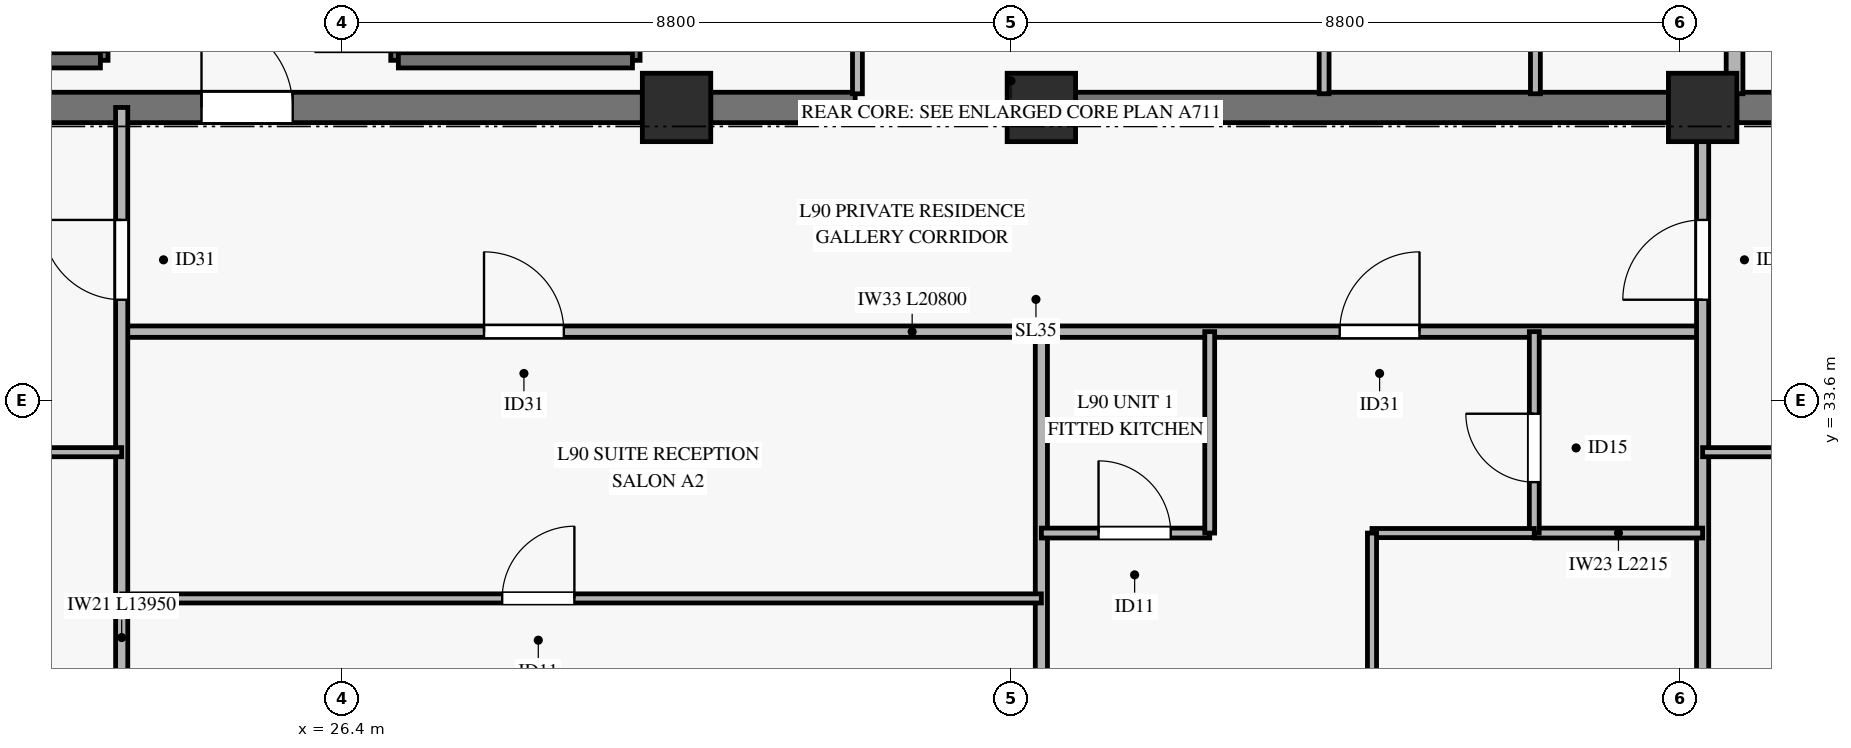
"""IFC4 building model, lengths in metres.
Left out: names, types, materials, properties, quantities, classifications, styles, units other than length and angle.
Written with IfcOpenShell. Run it as: python <this file> out.ifc"""

import sys

from ifc_helpers import new_model, si_unit, direction, frame, frame_2d, origin, origin_2d, place, context, subcontext, project, spatial, rectangle, extrude, source, transform, mapped, element, fill, save


model = new_model("IFC4")
c1 = context("Model", 3, precision=1e-05, world=origin(), true_north=direction((0.0, 1.0)))
c2 = subcontext(c1, "Body", "Model", "MODEL_VIEW")
j1 = project(units=[si_unit("LENGTHUNIT", "METRE"), si_unit("PLANEANGLEUNIT", "RADIAN")], contexts=[c1])
p1 = place(None, origin())
s1 = spatial("IfcSite", under=j1, at=p1, CompositionType="ELEMENT")
p2 = place(p1, origin())
s2 = spatial("IfcBuilding", under=s1, at=p2, CompositionType="ELEMENT")
p3 = place(p2, frame((0.0, 0.0, 345.9)))
s3 = spatial("IfcBuildingStorey", under=s2, at=p3, CompositionType="ELEMENT", Elevation=345.9)
m1 = source(origin(), c2, "Body", "SweptSolid", [
    extrude(rectangle(XDim=0.9, YDim=0.9, at=origin_2d()), origin(), (0.0, 0.0, 1.0), 3.185),
])
for number, where, z_axis, x_axis in (
    (1, (30.8, 37.45, 0.0), (0.0, 0.0, 1.0), (1.0, 0.0, 0.0)),
    (2, (35.6, 37.45, 0.0), (0.0, 0.0, 1.0), (1.0, 0.0, 0.0)),
    (3, (44.3, 37.45, 0.0), (0.0, 0.0, 1.0), (1.0, 0.0, 0.0)),
):
    element("IfcColumn", number, at=place(p3, frame(where, z_axis=z_axis, x_axis=x_axis)), inside=s3, PredefinedType="PILASTER", context=c2, shape_type="MappedRepresentation", body=[
        mapped(m1, transform((0.0, 0.0, 0.0), x_axis=(1.0, 0.0, 0.0), y_axis=(0.0, 1.0, 0.0), z_axis=(0.0, 0.0, 1.0), scale=1.0)),
    ])
p4 = place(p3, frame((20.3, 37.45, 0.0), z_axis=(0.0, 0.0, 1.0), x_axis=(1.0, 0.0, 0.0)))
e4 = element("IfcWall", 4, at=p4, inside=s3, PredefinedType="SHEAR", context=c2, shape_type="SweptSolid", body=[
    extrude(rectangle(XDim=10.05, YDim=0.4, at=frame_2d((5.025, 0.0))), origin(), (0.0, 0.0, 1.0), 3.185),
])
p5 = place(p4, frame((4.25, 0.0, 0.0)))
e5 = element("IfcOpeningElement", 5, at=p5, cuts=e4, PredefinedType="OPENING", context=c2, shape_type="SweptSolid", body=[
    extrude(rectangle(XDim=1.2, YDim=2.15, at=frame_2d((0.6, 1.075))), frame((0.0, 0.21, 0.0), z_axis=(0.0, -1.0, 0.0), x_axis=(1.0, 0.0, 0.0)), (0.0, 0.0, 1.0), 0.42),
])
p6 = place(p3, frame((31.25, 37.45, 0.0), z_axis=(0.0, 0.0, 1.0), x_axis=(1.0, 0.0, 0.0)))
e6 = element("IfcWall", 6, at=p6, inside=s3, PredefinedType="SHEAR", context=c2, shape_type="SweptSolid", body=[
    extrude(rectangle(XDim=1.9, YDim=0.4, at=frame_2d((0.95, 0.0))), origin(), (0.0, 0.0, 1.0), 3.185),
])
p7 = place(p3, frame((36.05, 37.45, 0.0), z_axis=(0.0, 0.0, 1.0), x_axis=(1.0, 0.0, 0.0)))
e7 = element("IfcWall", 7, at=p7, inside=s3, PredefinedType="SHEAR", context=c2, shape_type="SweptSolid", body=[
    extrude(rectangle(XDim=7.8, YDim=0.4, at=frame_2d((3.9, 0.0))), origin(), (0.0, 0.0, 1.0), 3.185),
])
p8 = place(p3, frame((44.75, 37.45, 0.0), z_axis=(0.0, 0.0, 1.0), x_axis=(1.0, 0.0, 0.0)))
e8 = element("IfcWall", 8, at=p8, inside=s3, PredefinedType="SHEAR", context=c2, shape_type="SweptSolid", body=[
    extrude(rectangle(XDim=5.35, YDim=0.4, at=frame_2d((2.675, 0.0))), origin(), (0.0, 0.0, 1.0), 3.185),
])
p9 = place(p8, frame((0.7, 0.0, 0.0)))
e9 = element("IfcOpeningElement", 9, at=p9, cuts=e8, PredefinedType="OPENING", context=c2, shape_type="SweptSolid", body=[
    extrude(rectangle(XDim=1.2, YDim=2.15, at=frame_2d((0.6, 1.075))), frame((0.0, 0.21, 0.0), z_axis=(0.0, -1.0, 0.0), x_axis=(1.0, 0.0, 0.0)), (0.0, 0.0, 1.0), 0.42),
])
p10 = place(p3, frame((23.22, 38.07, 0.0), z_axis=(0.0, 0.0, 1.0), x_axis=(0.0, 1.0, 0.0)))
e10 = element("IfcWall", 10, at=p10, inside=s3, PredefinedType="SOLIDWALL", context=c2, shape_type="SweptSolid", body=[
    extrude(rectangle(XDim=7.25, YDim=0.2, at=frame_2d((3.625, 0.0))), origin(), (0.0, 0.0, 1.0), 3.4),
])
p11 = place(p10, frame((0.11, 0.0, 0.0)))
e11 = element("IfcOpeningElement", 11, at=p11, cuts=e10, PredefinedType="OPENING", context=c2, shape_type="SweptSolid", body=[
    extrude(rectangle(XDim=1.1, YDim=2.15, at=frame_2d((0.55, 1.075))), frame((0.0, 0.11, 0.0), z_axis=(0.0, -1.0, 0.0), x_axis=(1.0, 0.0, 0.0)), (0.0, 0.0, 1.0), 0.22),
])
p12 = place(p3, frame((20.17, 38.07, 0.0), z_axis=(0.0, 0.0, 1.0), x_axis=(1.0, 0.0, 0.0)))
e12 = element("IfcWall", 12, at=p12, inside=s3, PredefinedType="SOLIDWALL", context=c2, shape_type="SweptSolid", body=[
    extrude(rectangle(XDim=3.05, YDim=0.2, at=frame_2d((1.525, 0.0))), origin(), (0.0, 0.0, 1.0), 3.4),
])
p13 = place(p3, frame((27.14, 38.07, 0.0), z_axis=(0.0, 0.0, 1.0), x_axis=(0.0, 1.0, 0.0)))
e13 = element("IfcWall", 13, at=p13, inside=s3, PredefinedType="SOLIDWALL", context=c2, shape_type="SweptSolid", body=[
    extrude(rectangle(XDim=7.25, YDim=0.2, at=frame_2d((3.625, 0.0))), origin(), (0.0, 0.0, 1.0), 3.4),
])
p14 = place(p13, frame((0.11, 0.0, 0.0)))
e14 = element("IfcOpeningElement", 14, at=p14, cuts=e13, PredefinedType="OPENING", context=c2, shape_type="SweptSolid", body=[
    extrude(rectangle(XDim=1.1, YDim=2.15, at=frame_2d((0.55, 1.075))), frame((0.0, 0.11, 0.0), z_axis=(0.0, -1.0, 0.0), x_axis=(1.0, 0.0, 0.0)), (0.0, 0.0, 1.0), 0.22),
])
p15 = place(p3, frame((30.22, 38.07, 0.0), z_axis=(0.0, 0.0, 1.0), x_axis=(0.0, 1.0, 0.0)))
e15 = element("IfcWall", 15, at=p15, inside=s3, PredefinedType="SOLIDWALL", context=c2, shape_type="SweptSolid", body=[
    extrude(rectangle(XDim=7.25, YDim=0.2, at=frame_2d((3.625, 0.0))), origin(), (0.0, 0.0, 1.0), 3.4),
])
p16 = place(p3, frame((27.14, 38.07, 0.0), z_axis=(0.0, 0.0, 1.0), x_axis=(1.0, 0.0, 0.0)))
e16 = element("IfcWall", 16, at=p16, inside=s3, PredefinedType="SOLIDWALL", context=c2, shape_type="SweptSolid", body=[
    extrude(rectangle(XDim=3.08, YDim=0.2, at=frame_2d((1.54, 0.0))), origin(), (0.0, 0.0, 1.0), 3.4),
])
p17 = place(p3, frame((44.72, 37.63, 0.0), z_axis=(0.0, 0.0, 1.0), x_axis=(0.0, 1.0, 0.0)))
e17 = element("IfcWall", 17, at=p17, inside=s3, PredefinedType="SOLIDWALL", context=c2, shape_type="SweptSolid", body=[
    extrude(rectangle(XDim=7.59, YDim=0.22, at=frame_2d((3.795, 0.0))), origin(), (0.0, 0.0, 1.0), 3.185),
])
p18 = place(p3, frame((33.18, 37.63, 0.0), z_axis=(0.0, 0.0, 1.0), x_axis=(0.0, 1.0, 0.0)))
e18 = element("IfcWall", 18, at=p18, inside=s3, PredefinedType="PARTITIONING", context=c2, shape_type="SweptSolid", body=[
    extrude(rectangle(XDim=6.52, YDim=0.13, at=frame_2d((3.26, 0.0))), origin(), (0.0, 0.0, 1.0), 2.27),
])
p19 = place(p18, frame((2.27, 0.0, 0.0)))
e19 = element("IfcOpeningElement", 19, at=p19, cuts=e18, PredefinedType="OPENING", context=c2, shape_type="SweptSolid", body=[
    extrude(rectangle(XDim=0.9, YDim=2.1, at=frame_2d((0.45, 1.05))), frame((0.0, 0.075, 0.0), z_axis=(0.0, -1.0, 0.0), x_axis=(1.0, 0.0, 0.0)), (0.0, 0.0, 1.0), 0.15),
])
p20 = place(p3, frame((39.32, 37.63, 0.0), z_axis=(0.0, 0.0, 1.0), x_axis=(0.0, 1.0, 0.0)))
e20 = element("IfcWall", 20, at=p20, inside=s3, PredefinedType="PARTITIONING", context=c2, shape_type="SweptSolid", body=[
    extrude(rectangle(XDim=8.74, YDim=0.13, at=frame_2d((4.37, 0.0))), origin(), (0.0, 0.0, 1.0), 3.185),
])
p21 = place(p20, frame((4.89, 0.0, 0.0)))
e21 = element("IfcOpeningElement", 21, at=p21, cuts=e20, PredefinedType="OPENING", context=c2, shape_type="SweptSolid", body=[
    extrude(rectangle(XDim=0.9, YDim=2.1, at=frame_2d((0.45, 1.05))), frame((0.0, 0.075, 0.0), z_axis=(0.0, -1.0, 0.0), x_axis=(1.0, 0.0, 0.0)), (0.0, 0.0, 1.0), 0.15),
])
p22 = place(p3, frame((42.1, 37.63, 0.0), z_axis=(0.0, 0.0, 1.0), x_axis=(0.0, 1.0, 0.0)))
e22 = element("IfcWall", 22, at=p22, inside=s3, PredefinedType="PARTITIONING", context=c2, shape_type="SweptSolid", body=[
    extrude(rectangle(XDim=8.74, YDim=0.13, at=frame_2d((4.37, 0.0))), origin(), (0.0, 0.0, 1.0), 3.185),
])
p23 = place(p22, frame((2.17, 0.0, 0.0)))
e23 = element("IfcOpeningElement", 23, at=p23, cuts=e22, PredefinedType="OPENING", context=c2, shape_type="SweptSolid", body=[
    extrude(rectangle(XDim=0.9, YDim=2.1, at=frame_2d((0.45, 1.05))), frame((0.0, 0.075, 0.0), z_axis=(0.0, -1.0, 0.0), x_axis=(1.0, 0.0, 0.0)), (0.0, 0.0, 1.0), 0.15),
])
p24 = place(p3, frame((23.5, 34.5, 0.0), z_axis=(0.0, 0.0, 1.0), x_axis=(1.0, 0.0, 0.0)))
e24 = element("IfcWall", 24, at=p24, inside=s3, PredefinedType="PARTITIONING", context=c2, shape_type="SweptSolid", body=[
    extrude(rectangle(XDim=20.8, YDim=0.15, at=frame_2d((10.4, 0.0))), origin(), (0.0, 0.0, 1.0), 2.47),
])
p25 = place(p24, frame((4.767, 0.0, 0.0)))
e25 = element("IfcOpeningElement", 25, at=p25, cuts=e24, PredefinedType="OPENING", context=c2, shape_type="SweptSolid", body=[
    extrude(rectangle(XDim=1.05, YDim=2.15, at=frame_2d((0.525, 1.075))), frame((0.0, 0.085, 0.0), z_axis=(0.0, -1.0, 0.0), x_axis=(1.0, 0.0, 0.0)), (0.0, 0.0, 1.0), 0.17),
])
p26 = place(p24, frame((16.025, 0.0, 0.0)))
e26 = element("IfcOpeningElement", 26, at=p26, cuts=e24, PredefinedType="OPENING", context=c2, shape_type="SweptSolid", body=[
    extrude(rectangle(XDim=1.05, YDim=2.15, at=frame_2d((0.525, 1.075))), frame((0.0, 0.085, 0.0), z_axis=(0.0, -1.0, 0.0), x_axis=(1.0, 0.0, 0.0)), (0.0, 0.0, 1.0), 0.17),
])
p27 = place(p3, frame((23.5, 23.5, 0.0), z_axis=(0.0, 0.0, 1.0), x_axis=(0.0, 1.0, 0.0)))
e27 = element("IfcWall", 27, at=p27, inside=s3, PredefinedType="PARTITIONING", context=c2, shape_type="SweptSolid", body=[
    extrude(rectangle(XDim=13.95, YDim=0.16, at=frame_2d((6.975, 0.0))), origin(), (0.0, 0.0, 1.0), 2.77),
])
p28 = place(p27, frame((11.42, 0.0, 0.0)))
e28 = element("IfcOpeningElement", 28, at=p28, cuts=e27, PredefinedType="OPENING", context=c2, shape_type="SweptSolid", body=[
    extrude(rectangle(XDim=1.05, YDim=2.15, at=frame_2d((0.525, 1.075))), frame((0.0, 0.09, 0.0), z_axis=(0.0, -1.0, 0.0), x_axis=(1.0, 0.0, 0.0)), (0.0, 0.0, 1.0), 0.18),
])
p29 = place(p3, frame((35.6, 23.5, 0.0), z_axis=(0.0, 0.0, 1.0), x_axis=(0.0, 1.0, 0.0)))
e29 = element("IfcWall", 29, at=p29, inside=s3, PredefinedType="PARTITIONING", context=c2, shape_type="SweptSolid", body=[
    extrude(rectangle(XDim=11.0, YDim=0.16, at=frame_2d((5.5, 0.0))), origin(), (0.0, 0.0, 1.0), 2.77),
])
p30 = place(p3, frame((44.3, 23.5, 0.0), z_axis=(0.0, 0.0, 1.0), x_axis=(0.0, 1.0, 0.0)))
e30 = element("IfcWall", 30, at=p30, inside=s3, PredefinedType="PARTITIONING", context=c2, shape_type="SweptSolid", body=[
    extrude(rectangle(XDim=13.95, YDim=0.16, at=frame_2d((6.975, 0.0))), origin(), (0.0, 0.0, 1.0), 2.47),
])
p31 = place(p30, frame((11.42, 0.0, 0.0)))
e31 = element("IfcOpeningElement", 31, at=p31, cuts=e30, PredefinedType="OPENING", context=c2, shape_type="SweptSolid", body=[
    extrude(rectangle(XDim=1.05, YDim=2.15, at=frame_2d((0.525, 1.075))), frame((0.0, 0.09, 0.0), z_axis=(0.0, -1.0, 0.0), x_axis=(1.0, 0.0, 0.0)), (0.0, 0.0, 1.0), 0.18),
])
p32 = place(p3, frame((12.1, 32.914, 0.0), z_axis=(0.0, 0.0, 1.0), x_axis=(1.0, 0.0, 0.0)))
e32 = element("IfcWall", 32, at=p32, inside=s3, PredefinedType="PARTITIONING", context=c2, shape_type="SweptSolid", body=[
    extrude(rectangle(XDim=11.4, YDim=0.12, at=frame_2d((5.7, 0.0))), origin(), (0.0, 0.0, 1.0), 2.47),
])
p33 = place(p32, frame((4.846, 0.0, 0.0)))
e33 = element("IfcOpeningElement", 33, at=p33, cuts=e32, PredefinedType="OPENING", context=c2, shape_type="SweptSolid", body=[
    extrude(rectangle(XDim=0.95, YDim=2.1, at=frame_2d((0.475, 1.05))), frame((0.0, 0.07, 0.0), z_axis=(0.0, -1.0, 0.0), x_axis=(1.0, 0.0, 0.0)), (0.0, 0.0, 1.0), 0.14),
])
p34 = place(p3, frame((23.5, 30.99, 0.0), z_axis=(0.0, 0.0, 1.0), x_axis=(1.0, 0.0, 0.0)))
e34 = element("IfcWall", 34, at=p34, inside=s3, PredefinedType="PARTITIONING", context=c2, shape_type="SweptSolid", body=[
    extrude(rectangle(XDim=12.1, YDim=0.12, at=frame_2d((6.05, 0.0))), origin(), (0.0, 0.0, 1.0), 2.47),
])
p35 = place(p34, frame((5.006, 0.0, 0.0)))
e35 = element("IfcOpeningElement", 35, at=p35, cuts=e34, PredefinedType="OPENING", context=c2, shape_type="SweptSolid", body=[
    extrude(rectangle(XDim=0.95, YDim=2.1, at=frame_2d((0.475, 1.05))), frame((0.0, 0.07, 0.0), z_axis=(0.0, -1.0, 0.0), x_axis=(1.0, 0.0, 0.0)), (0.0, 0.0, 1.0), 0.14),
])
p36 = place(p3, frame((35.6, 31.85, 0.0), z_axis=(0.0, 0.0, 1.0), x_axis=(1.0, 0.0, 0.0)))
e36 = element("IfcWall", 36, at=p36, inside=s3, PredefinedType="PARTITIONING", context=c2, shape_type="SweptSolid", body=[
    extrude(rectangle(XDim=2.215, YDim=0.13, at=frame_2d((1.107, 0.0))), origin(), (0.0, 0.0, 1.0), 2.47),
])
p37 = place(p36, frame((0.752, 0.0, 0.0)))
e37 = element("IfcOpeningElement", 37, at=p37, cuts=e36, PredefinedType="OPENING", context=c2, shape_type="SweptSolid", body=[
    extrude(rectangle(XDim=0.95, YDim=2.1, at=frame_2d((0.475, 1.05))), frame((0.0, 0.075, 0.0), z_axis=(0.0, -1.0, 0.0), x_axis=(1.0, 0.0, 0.0)), (0.0, 0.0, 1.0), 0.15),
])
p38 = place(p3, frame((37.815, 31.85, 0.0), z_axis=(0.0, 0.0, 1.0), x_axis=(0.0, 1.0, 0.0)))
e38 = element("IfcWall", 38, at=p38, inside=s3, PredefinedType="PARTITIONING", context=c2, shape_type="SweptSolid", body=[
    extrude(rectangle(XDim=2.65, YDim=0.13, at=frame_2d((1.325, 0.0))), origin(), (0.0, 0.0, 1.0), 2.77),
])
p39 = place(p3, frame((42.085, 31.85, 0.0), z_axis=(0.0, 0.0, 1.0), x_axis=(1.0, 0.0, 0.0)))
e39 = element("IfcWall", 39, at=p39, inside=s3, PredefinedType="PARTITIONING", context=c2, shape_type="SweptSolid", body=[
    extrude(rectangle(XDim=2.215, YDim=0.13, at=frame_2d((1.107, 0.0))), origin(), (0.0, 0.0, 1.0), 2.47),
])
p40 = place(p3, frame((42.085, 31.85, 0.0), z_axis=(0.0, 0.0, 1.0), x_axis=(0.0, 1.0, 0.0)))
e40 = element("IfcWall", 40, at=p40, inside=s3, PredefinedType="PARTITIONING", context=c2, shape_type="SweptSolid", body=[
    extrude(rectangle(XDim=2.65, YDim=0.13, at=frame_2d((1.325, 0.0))), origin(), (0.0, 0.0, 1.0), 2.77),
])
p41 = place(p40, frame((0.67, 0.0, 0.0)))
e41 = element("IfcOpeningElement", 41, at=p41, cuts=e40, PredefinedType="OPENING", context=c2, shape_type="SweptSolid", body=[
    extrude(rectangle(XDim=0.9, YDim=2.1, at=frame_2d((0.45, 1.05))), frame((0.0, 0.075, 0.0), z_axis=(0.0, -1.0, 0.0), x_axis=(1.0, 0.0, 0.0)), (0.0, 0.0, 1.0), 0.15),
])
p42 = place(p3, frame((39.95, 31.85, 0.0), z_axis=(0.0, 0.0, 1.0), x_axis=(1.0, 0.0, 0.0)))
e42 = element("IfcWall", 42, at=p42, inside=s3, PredefinedType="PARTITIONING", context=c2, shape_type="SweptSolid", body=[
    extrude(rectangle(XDim=2.135, YDim=0.12, at=frame_2d((1.067, 0.0))), origin(), (0.0, 0.0, 1.0), 3.185),
])
p43 = place(p3, frame((39.95, 23.5, 0.0), z_axis=(0.0, 0.0, 1.0), x_axis=(0.0, 1.0, 0.0)))
e43 = element("IfcWall", 43, at=p43, inside=s3, PredefinedType="PARTITIONING", context=c2, shape_type="SweptSolid", body=[
    extrude(rectangle(XDim=8.35, YDim=0.12, at=frame_2d((4.175, 0.0))), origin(), (0.0, 0.0, 1.0), 2.77),
])
p44 = place(p43, frame((1.72, 0.0, 0.0)))
e44 = element("IfcOpeningElement", 44, at=p44, cuts=e43, PredefinedType="OPENING", context=c2, shape_type="SweptSolid", body=[
    extrude(rectangle(XDim=0.95, YDim=2.1, at=frame_2d((0.475, 1.05))), frame((0.0, 0.07, 0.0), z_axis=(0.0, -1.0, 0.0), x_axis=(1.0, 0.0, 0.0)), (0.0, 0.0, 1.0), 0.14),
])
p45 = place(p3, frame((44.3, 32.914, 0.0), z_axis=(0.0, 0.0, 1.0), x_axis=(1.0, 0.0, 0.0)))
e45 = element("IfcWall", 45, at=p45, inside=s3, PredefinedType="PARTITIONING", context=c2, shape_type="SweptSolid", body=[
    extrude(rectangle(XDim=14.0, YDim=0.12, at=frame_2d((7.0, 0.0))), origin(), (0.0, 0.0, 1.0), 2.47),
])
p46 = place(p45, frame((5.686, 0.0, 0.0)))
e46 = element("IfcOpeningElement", 46, at=p46, cuts=e45, PredefinedType="OPENING", context=c2, shape_type="SweptSolid", body=[
    extrude(rectangle(XDim=0.95, YDim=2.1, at=frame_2d((0.475, 1.05))), frame((0.0, 0.07, 0.0), z_axis=(0.0, -1.0, 0.0), x_axis=(1.0, 0.0, 0.0)), (0.0, 0.0, 1.0), 0.14),
])
m2 = source(origin(), c2, "Body", "SweptSolid", [
    extrude(rectangle(XDim=1.2, YDim=2.15, at=frame_2d((0.6, 1.075))), frame((0.0, 0.025, 0.0), z_axis=(0.0, -1.0, 0.0), x_axis=(1.0, 0.0, 0.0)), (0.0, 0.0, 1.0), 0.05),
])
p47 = place(p5, origin())
e47 = element("IfcDoor", 47, at=p47, inside=s3, OperationType="SINGLE_SWING_LEFT", PredefinedType="DOOR", context=c2, shape_type="MappedRepresentation", body=[
    mapped(m2, transform((0.0, 0.0, 0.0), x_axis=(1.0, 0.0, 0.0), y_axis=(0.0, 1.0, 0.0), z_axis=(0.0, 0.0, 1.0), scale=1.0)),
])
fill(e5, e47)
m3 = source(origin(), c2, "Body", "SweptSolid", [
    extrude(rectangle(XDim=1.05, YDim=2.15, at=frame_2d((0.525, 1.075))), frame((0.0, 0.025, 0.0), z_axis=(0.0, -1.0, 0.0), x_axis=(1.0, 0.0, 0.0)), (0.0, 0.0, 1.0), 0.05),
])
p48 = place(p28, origin())
e48 = element("IfcDoor", 48, at=p48, inside=s3, OperationType="SINGLE_SWING_RIGHT", PredefinedType="DOOR", context=c2, shape_type="MappedRepresentation", body=[
    mapped(m3, transform((0.0, 0.0, 0.0), x_axis=(1.0, 0.0, 0.0), y_axis=(0.0, 1.0, 0.0), z_axis=(0.0, 0.0, 1.0), scale=1.0)),
])
fill(e28, e48)
p49 = place(p25, origin())
e49 = element("IfcDoor", 49, at=p49, inside=s3, OperationType="SINGLE_SWING_LEFT", PredefinedType="DOOR", context=c2, shape_type="MappedRepresentation", body=[
    mapped(m3, transform((0.0, 0.0, 0.0), x_axis=(1.0, 0.0, 0.0), y_axis=(0.0, 1.0, 0.0), z_axis=(0.0, 0.0, 1.0), scale=1.0)),
])
fill(e25, e49)
m4 = source(origin(), c2, "Body", "SweptSolid", [
    extrude(rectangle(XDim=0.95, YDim=2.1, at=frame_2d((0.475, 1.05))), frame((0.0, 0.025, 0.0), z_axis=(0.0, -1.0, 0.0), x_axis=(1.0, 0.0, 0.0)), (0.0, 0.0, 1.0), 0.05),
])
p50 = place(p35, origin())
e50 = element("IfcDoor", 50, at=p50, inside=s3, OperationType="SINGLE_SWING_RIGHT", PredefinedType="DOOR", context=c2, shape_type="MappedRepresentation", body=[
    mapped(m4, transform((0.0, 0.0, 0.0), x_axis=(1.0, 0.0, 0.0), y_axis=(0.0, 1.0, 0.0), z_axis=(0.0, 0.0, 1.0), scale=1.0)),
])
fill(e35, e50)
p51 = place(p26, origin())
e51 = element("IfcDoor", 51, at=p51, inside=s3, OperationType="SINGLE_SWING_RIGHT", PredefinedType="DOOR", context=c2, shape_type="MappedRepresentation", body=[
    mapped(m3, transform((0.0, 0.0, 0.0), x_axis=(1.0, 0.0, 0.0), y_axis=(0.0, 1.0, 0.0), z_axis=(0.0, 0.0, 1.0), scale=1.0)),
])
fill(e26, e51)
p52 = place(p37, origin())
e52 = element("IfcDoor", 52, at=p52, inside=s3, OperationType="SINGLE_SWING_LEFT", PredefinedType="DOOR", context=c2, shape_type="MappedRepresentation", body=[
    mapped(m4, transform((0.0, 0.0, 0.0), x_axis=(1.0, 0.0, 0.0), y_axis=(0.0, 1.0, 0.0), z_axis=(0.0, 0.0, 1.0), scale=1.0)),
])
fill(e37, e52)
m5 = source(origin(), c2, "Body", "SweptSolid", [
    extrude(rectangle(XDim=0.9, YDim=2.1, at=frame_2d((0.45, 1.05))), frame((0.0, 0.025, 0.0), z_axis=(0.0, -1.0, 0.0), x_axis=(1.0, 0.0, 0.0)), (0.0, 0.0, 1.0), 0.05),
])
p53 = place(p41, origin())
e53 = element("IfcDoor", 53, at=p53, inside=s3, OperationType="SINGLE_SWING_RIGHT", PredefinedType="DOOR", context=c2, shape_type="MappedRepresentation", body=[
    mapped(m5, transform((0.0, 0.0, 0.0), x_axis=(1.0, 0.0, 0.0), y_axis=(0.0, 1.0, 0.0), z_axis=(0.0, 0.0, 1.0), scale=1.0)),
])
fill(e41, e53)
p54 = place(p31, origin())
e54 = element("IfcDoor", 54, at=p54, inside=s3, OperationType="SINGLE_SWING_LEFT", PredefinedType="DOOR", context=c2, shape_type="MappedRepresentation", body=[
    mapped(m3, transform((0.0, 0.0, 0.0), x_axis=(1.0, 0.0, 0.0), y_axis=(0.0, 1.0, 0.0), z_axis=(0.0, 0.0, 1.0), scale=1.0)),
])
fill(e31, e54)
save(model, sys.argv[1])
